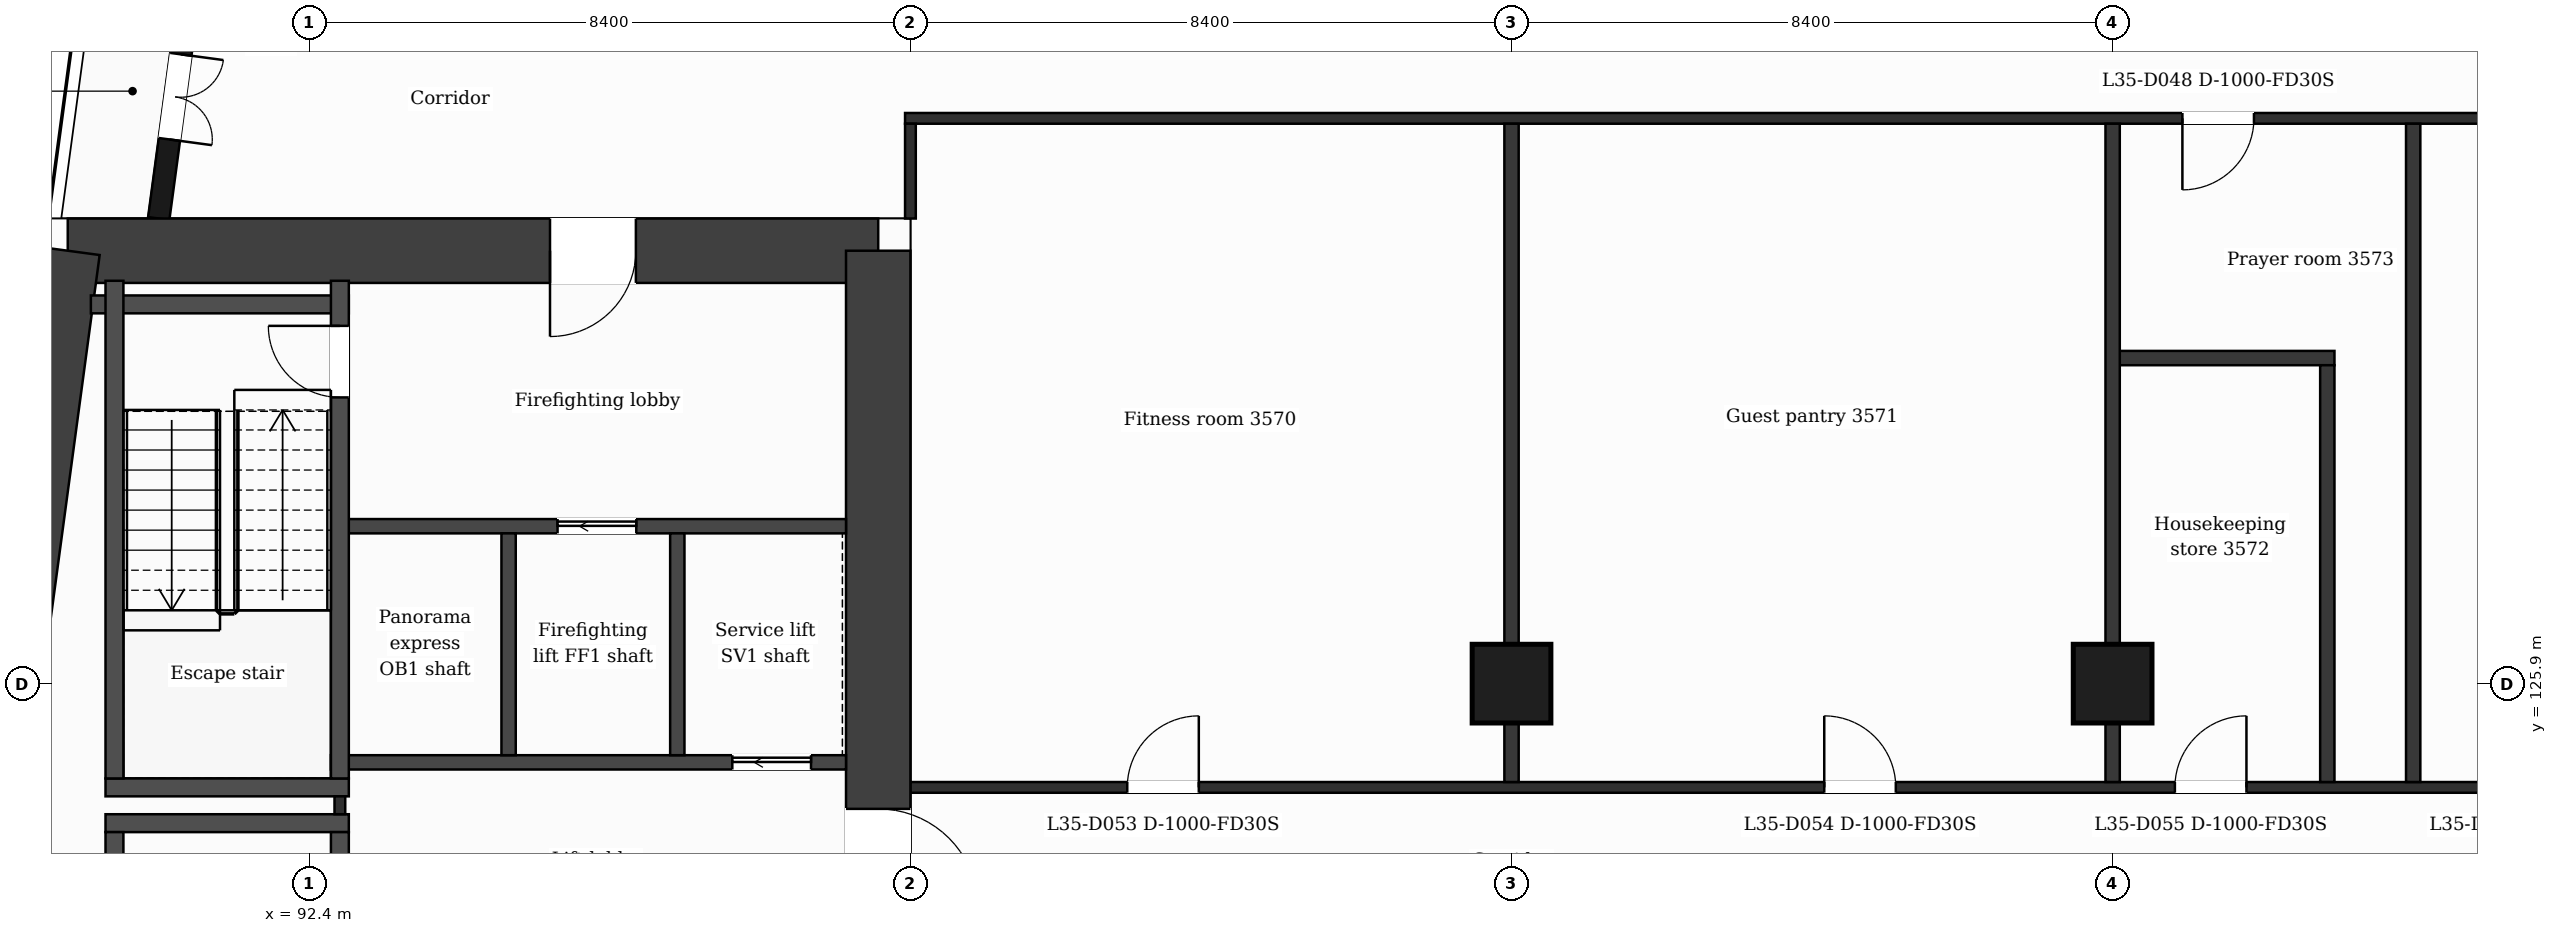
"""IFC4 building model, lengths in metres.
Left out: names, types, materials, properties, quantities, classifications, styles, units other than length and angle.
Written with IfcOpenShell. Run it as: python <this file> out.ifc"""

import sys

from ifc_helpers import new_model, si_unit, direction, frame, frame_2d, origin, origin_2d, place, context, subcontext, project, spatial, rectangle, extrude, element, fill, save


model = new_model("IFC4")
c1 = context("Model", 3, precision=1e-05, world=origin(), true_north=direction((0.0, 1.0)))
c2 = subcontext(c1, "Body", "Model", "MODEL_VIEW")
j1 = project(units=[si_unit("LENGTHUNIT", "METRE"), si_unit("PLANEANGLEUNIT", "RADIAN")], contexts=[c1])
p1 = place(None, origin())
s1 = spatial("IfcSite", under=j1, at=p1, CompositionType="ELEMENT")
p2 = place(p1, origin())
s2 = spatial("IfcBuilding", under=s1, at=p2, CompositionType="ELEMENT")
p3 = place(p2, frame((0.0, 0.0, 151.5)))
s3 = spatial("IfcBuildingStorey", under=s2, at=p3, CompositionType="ELEMENT", Elevation=151.5)
p4 = place(p3, frame((89.024, 131.95, 0.0), z_axis=(0.0, 0.0, 1.0), x_axis=(1.0, 0.0, 0.0)))
e1 = element("IfcWall", 1, at=p4, inside=s3, PredefinedType="SHEAR", context=c2, shape_type="SweptSolid", body=[
    extrude(rectangle(XDim=11.326, YDim=0.9, at=frame_2d((5.663, 0.0))), origin(), (0.0, 0.0, 1.0), 3.7),
])
p5 = place(p4, frame((6.739, 0.0, 0.0)))
e2 = element("IfcOpeningElement", 2, at=p5, cuts=e1, PredefinedType="OPENING", context=c2, shape_type="SweptSolid", body=[
    extrude(rectangle(XDim=1.2, YDim=2.1, at=frame_2d((0.6, 1.05))), frame((0.0, 0.46, 0.0), z_axis=(0.0, -1.0, 0.0), x_axis=(1.0, 0.0, 0.0)), (0.0, 0.0, 1.0), 0.92),
])
p6 = place(p3, frame((100.35, 131.95, 0.0), z_axis=(0.0, 0.0, 1.0), x_axis=(0.0, -1.0, 0.0)))
e3 = element("IfcWall", 3, at=p6, inside=s3, PredefinedType="SHEAR", context=c2, shape_type="SweptSolid", body=[
    extrude(rectangle(XDim=21.1, YDim=0.9, at=frame_2d((10.55, 0.0))), origin(), (0.0, 0.0, 1.0), 3.7),
])
p7 = place(p6, frame((7.8, 0.0, 0.0)))
e4 = element("IfcOpeningElement", 4, at=p7, cuts=e3, PredefinedType="OPENING", context=c2, shape_type="SweptSolid", body=[
    extrude(rectangle(XDim=1.4, YDim=2.1, at=frame_2d((0.7, 1.05))), frame((0.0, 0.46, 0.0), z_axis=(0.0, -1.0, 0.0), x_axis=(1.0, 0.0, 0.0)), (0.0, 0.0, 1.0), 0.92),
])
p8 = place(p3, frame((86.184, 110.85, 0.0), z_axis=(0.0, 0.0, 1.0), x_axis=(0.133410495943, 0.991060865725, 0.0)))
e5 = element("IfcWall", 5, at=p8, inside=s3, PredefinedType="SHEAR", context=c2, shape_type="SweptSolid", body=[
    extrude(rectangle(XDim=21.29, YDim=0.9, at=frame_2d((10.645, 0.0))), origin(), (0.0, 0.0, 1.0), 3.7),
])
for number, where, z_axis, x_axis in (
    (6, (109.2, 125.9, 0.0), (0.0, 0.0, 1.0), (1.0, 0.0, 0.0)),
    (7, (117.6, 125.9, 0.0), (0.0, 0.0, 1.0), (1.0, 0.0, 0.0)),
):
    element("IfcColumn", number, at=place(p3, frame(where, z_axis=z_axis, x_axis=x_axis)), inside=s3, PredefinedType="COLUMN", context=c2, shape_type="SweptSolid", body=[
        extrude(rectangle(XDim=1.1, YDim=1.1, at=origin_2d()), origin(), (0.0, 0.0, 1.0), 3.7),
    ])
p9 = place(p3, frame((91.177, 138.95, 0.0), z_axis=(0.0, 0.0, 1.0), x_axis=(-0.133426664613, -0.991058689065, 0.0)))
e8 = element("IfcWall", 8, at=p9, inside=s3, PredefinedType="SOLIDWALL", context=c2, shape_type="SweptSolid", body=[
    extrude(rectangle(XDim=6.609, YDim=0.3, at=frame_2d((3.305, 0.0))), origin(), (0.0, 0.0, 1.0), 3.38),
])
p10 = place(p9, frame((1.039, 0.0, 0.9)))
e9 = element("IfcOpeningElement", 9, at=p10, cuts=e8, PredefinedType="OPENING", context=c2, shape_type="SweptSolid", body=[
    extrude(rectangle(XDim=1.2, YDim=2.1, at=frame_2d((0.6, 1.05))), frame((0.0, 0.16, 0.0), z_axis=(0.0, -1.0, 0.0), x_axis=(1.0, 0.0, 0.0)), (0.0, 0.0, 1.0), 0.32),
])
p11 = place(p9, frame((4.294, 0.0, 0.0)))
e10 = element("IfcOpeningElement", 10, at=p11, cuts=e8, PredefinedType="OPENING", context=c2, shape_type="SweptSolid", body=[
    extrude(rectangle(XDim=1.2, YDim=2.4, at=frame_2d((0.6, 1.2))), frame((0.0, 0.16, 0.0), z_axis=(0.0, -1.0, 0.0), x_axis=(1.0, 0.0, 0.0)), (0.0, 0.0, 1.0), 0.32),
])
for number, where, z_axis, x_axis in (
    (11, (89.552, 123.95, 0.0), (0.0, 0.0, 1.0), (1.0, 0.0, 0.0)),
    (12, (89.552, 124.45, 0.0), (0.0, 0.0, 1.0), (1.0, 0.0, 0.0)),
):
    element("IfcWall", number, at=place(p3, frame(where, z_axis=z_axis, x_axis=x_axis)), inside=s3, PredefinedType="PARTITIONING", context=c2, shape_type="SweptSolid", body=[
        extrude(rectangle(XDim=3.4, YDim=0.25, at=frame_2d((1.7, 0.0))), origin(), (0.0, 0.0, 1.0), 3.38),
    ])
p12 = place(p3, frame((100.8, 124.45, 0.0), z_axis=(0.0, 0.0, 1.0), x_axis=(1.0, 0.0, 0.0)))
e13 = element("IfcWall", 13, at=p12, inside=s3, PredefinedType="PARTITIONING", context=c2, shape_type="SweptSolid", body=[
    extrude(rectangle(XDim=25.2, YDim=0.15, at=frame_2d((12.6, 0.0))), origin(), (0.0, 0.0, 1.0), 3.38),
])
p13 = place(p12, frame((3.03, 0.0, 0.0)))
e14 = element("IfcOpeningElement", 14, at=p13, cuts=e13, PredefinedType="OPENING", context=c2, shape_type="SweptSolid", body=[
    extrude(rectangle(XDim=1.0, YDim=2.1, at=frame_2d((0.5, 1.05))), frame((0.0, 0.085, 0.0), z_axis=(0.0, -1.0, 0.0), x_axis=(1.0, 0.0, 0.0)), (0.0, 0.0, 1.0), 0.17),
])
p14 = place(p12, frame((12.77, 0.0, 0.0)))
e15 = element("IfcOpeningElement", 15, at=p14, cuts=e13, PredefinedType="OPENING", context=c2, shape_type="SweptSolid", body=[
    extrude(rectangle(XDim=1.0, YDim=2.1, at=frame_2d((0.5, 1.05))), frame((0.0, 0.085, 0.0), z_axis=(0.0, -1.0, 0.0), x_axis=(1.0, 0.0, 0.0)), (0.0, 0.0, 1.0), 0.17),
])
p15 = place(p12, frame((17.67, 0.0, 0.0)))
e16 = element("IfcOpeningElement", 16, at=p15, cuts=e13, PredefinedType="OPENING", context=c2, shape_type="SweptSolid", body=[
    extrude(rectangle(XDim=1.0, YDim=2.1, at=frame_2d((0.5, 1.05))), frame((0.0, 0.085, 0.0), z_axis=(0.0, -1.0, 0.0), x_axis=(1.0, 0.0, 0.0)), (0.0, 0.0, 1.0), 0.17),
])
p16 = place(p12, frame((22.35, 0.0, 0.0)))
e17 = element("IfcOpeningElement", 17, at=p16, cuts=e13, PredefinedType="OPENING", context=c2, shape_type="SweptSolid", body=[
    extrude(rectangle(XDim=1.0, YDim=2.1, at=frame_2d((0.5, 1.05))), frame((0.0, 0.085, 0.0), z_axis=(0.0, -1.0, 0.0), x_axis=(1.0, 0.0, 0.0)), (0.0, 0.0, 1.0), 0.17),
])
p17 = place(p3, frame((92.702, 124.8, 0.0), z_axis=(0.0, 0.0, 1.0), x_axis=(1.0, 0.0, 0.0)))
e18 = element("IfcWall", 18, at=p17, inside=s3, PredefinedType="PARTITIONING", context=c2, shape_type="SweptSolid", body=[
    extrude(rectangle(XDim=7.198, YDim=0.2, at=frame_2d((3.599, 0.0))), origin(), (0.0, 0.0, 1.0), 3.38),
])
p18 = place(p17, frame((5.609, 0.0, 0.0)))
e19 = element("IfcOpeningElement", 19, at=p18, cuts=e18, PredefinedType="OPENING", context=c2, shape_type="SweptSolid", body=[
    extrude(rectangle(XDim=1.1, YDim=2.1, at=frame_2d((0.55, 1.05))), frame((0.0, 0.11, 0.0), z_axis=(0.0, -1.0, 0.0), x_axis=(1.0, 0.0, 0.0)), (0.0, 0.0, 1.0), 0.22),
])
p19 = place(p3, frame((92.827, 128.1, 0.0), z_axis=(0.0, 0.0, 1.0), x_axis=(1.0, 0.0, 0.0)))
e20 = element("IfcWall", 20, at=p19, inside=s3, PredefinedType="PARTITIONING", context=c2, shape_type="SweptSolid", body=[
    extrude(rectangle(XDim=7.073, YDim=0.2, at=frame_2d((3.537, 0.0))), origin(), (0.0, 0.0, 1.0), 3.38),
])
p20 = place(p19, frame((3.042, 0.0, 0.0)))
e21 = element("IfcOpeningElement", 21, at=p20, cuts=e20, PredefinedType="OPENING", context=c2, shape_type="SweptSolid", body=[
    extrude(rectangle(XDim=1.1, YDim=2.1, at=frame_2d((0.55, 1.05))), frame((0.0, 0.11, 0.0), z_axis=(0.0, -1.0, 0.0), x_axis=(1.0, 0.0, 0.0)), (0.0, 0.0, 1.0), 0.22),
])
p21 = place(p3, frame((117.6, 130.45, 0.0), z_axis=(0.0, 0.0, 1.0), x_axis=(1.0, 0.0, 0.0)))
e22 = element("IfcWall", 22, at=p21, inside=s3, PredefinedType="PARTITIONING", context=c2, shape_type="SweptSolid", body=[
    extrude(rectangle(XDim=3.1, YDim=0.2, at=frame_2d((1.55, 0.0))), origin(), (0.0, 0.0, 1.0), 3.38),
])
p22 = place(p3, frame((89.347, 131.2, 0.0), z_axis=(0.0, 0.0, 1.0), x_axis=(1.0, 0.0, 0.0)))
e23 = element("IfcWall", 23, at=p22, inside=s3, PredefinedType="PARTITIONING", context=c2, shape_type="SweptSolid", body=[
    extrude(rectangle(XDim=3.604, YDim=0.25, at=frame_2d((1.802, 0.0))), origin(), (0.0, 0.0, 1.0), 3.38),
])
p23 = place(p3, frame((100.725, 133.8, 0.0), z_axis=(0.0, 0.0, 1.0), x_axis=(1.0, 0.0, 0.0)))
e24 = element("IfcWall", 24, at=p23, inside=s3, PredefinedType="PARTITIONING", context=c2, shape_type="SweptSolid", body=[
    extrude(rectangle(XDim=25.35, YDim=0.15, at=frame_2d((12.675, 0.0))), origin(), (0.0, 0.0, 1.0), 3.38),
])
p24 = place(p23, frame((17.85, 0.0, 0.0)))
e25 = element("IfcOpeningElement", 25, at=p24, cuts=e24, PredefinedType="OPENING", context=c2, shape_type="SweptSolid", body=[
    extrude(rectangle(XDim=1.0, YDim=2.1, at=frame_2d((0.5, 1.05))), frame((0.0, 0.085, 0.0), z_axis=(0.0, -1.0, 0.0), x_axis=(1.0, 0.0, 0.0)), (0.0, 0.0, 1.0), 0.17),
])
p25 = place(p3, frame((89.677, 116.87, 0.0), z_axis=(0.0, 0.0, 1.0), x_axis=(0.0, 1.0, 0.0)))
e26 = element("IfcWall", 26, at=p25, inside=s3, PredefinedType="PARTITIONING", context=c2, shape_type="SweptSolid", body=[
    extrude(rectangle(XDim=6.955, YDim=0.25, at=frame_2d((3.478, 0.0))), origin(), (0.0, 0.0, 1.0), 3.38),
])
p26 = place(p3, frame((89.677, 124.575, 0.0), z_axis=(0.0, 0.0, 1.0), x_axis=(0.0, 1.0, 0.0)))
e27 = element("IfcWall", 27, at=p26, inside=s3, PredefinedType="PARTITIONING", context=c2, shape_type="SweptSolid", body=[
    extrude(rectangle(XDim=6.955, YDim=0.25, at=frame_2d((3.478, 0.0))), origin(), (0.0, 0.0, 1.0), 3.38),
])
p27 = place(p3, frame((92.827, 124.075, 0.0), z_axis=(0.0, 0.0, 1.0), x_axis=(0.0, 1.0, 0.0)))
e28 = element("IfcWall", 28, at=p27, inside=s3, PredefinedType="PARTITIONING", context=c2, shape_type="SweptSolid", body=[
    extrude(rectangle(XDim=0.25, YDim=0.15, at=frame_2d((0.125, 0.0))), origin(), (0.0, 0.0, 1.0), 3.38),
])
p28 = place(p3, frame((92.827, 116.87, 0.0), z_axis=(0.0, 0.0, 1.0), x_axis=(0.0, 1.0, 0.0)))
e29 = element("IfcWall", 29, at=p28, inside=s3, PredefinedType="PARTITIONING", context=c2, shape_type="SweptSolid", body=[
    extrude(rectangle(XDim=6.955, YDim=0.25, at=frame_2d((3.478, 0.0))), origin(), (0.0, 0.0, 1.0), 3.38),
])
p29 = place(p28, frame((5.655, 0.0, 0.0)))
e30 = element("IfcOpeningElement", 30, at=p29, cuts=e29, PredefinedType="OPENING", context=c2, shape_type="SweptSolid", body=[
    extrude(rectangle(XDim=0.95, YDim=2.1, at=frame_2d((0.475, 1.05))), frame((0.0, 0.135, 0.0), z_axis=(0.0, -1.0, 0.0), x_axis=(1.0, 0.0, 0.0)), (0.0, 0.0, 1.0), 0.27),
])
p30 = place(p3, frame((92.827, 124.575, 0.0), z_axis=(0.0, 0.0, 1.0), x_axis=(0.0, 1.0, 0.0)))
e31 = element("IfcWall", 31, at=p30, inside=s3, PredefinedType="PARTITIONING", context=c2, shape_type="SweptSolid", body=[
    extrude(rectangle(XDim=6.955, YDim=0.25, at=frame_2d((3.478, 0.0))), origin(), (0.0, 0.0, 1.0), 3.38),
])
p31 = place(p30, frame((5.325, 0.0, 0.0)))
e32 = element("IfcOpeningElement", 32, at=p31, cuts=e31, PredefinedType="OPENING", context=c2, shape_type="SweptSolid", body=[
    extrude(rectangle(XDim=1.0, YDim=2.1, at=frame_2d((0.5, 1.05))), frame((0.0, 0.135, 0.0), z_axis=(0.0, -1.0, 0.0), x_axis=(1.0, 0.0, 0.0)), (0.0, 0.0, 1.0), 0.27),
])
for number, where, z_axis, x_axis in (
    (33, (95.185, 124.9, 0.0), (0.0, 0.0, 1.0), (0.0, 1.0, 0.0)),
    (34, (97.542, 124.9, 0.0), (0.0, 0.0, 1.0), (0.0, 1.0, 0.0)),
):
    element("IfcWall", number, at=place(p3, frame(where, z_axis=z_axis, x_axis=x_axis)), inside=s3, PredefinedType="PARTITIONING", context=c2, shape_type="SweptSolid", body=[
        extrude(rectangle(XDim=3.1, YDim=0.2, at=frame_2d((1.55, 0.0))), origin(), (0.0, 0.0, 1.0), 3.38),
    ])
p32 = place(p3, frame((100.8, 132.4, 0.0), z_axis=(0.0, 0.0, 1.0), x_axis=(0.0, 1.0, 0.0)))
e35 = element("IfcWall", 35, at=p32, inside=s3, PredefinedType="PARTITIONING", context=c2, shape_type="SweptSolid", body=[
    extrude(rectangle(XDim=1.325, YDim=0.15, at=frame_2d((0.663, 0.0))), origin(), (0.0, 0.0, 1.0), 3.38),
])
for number, where, z_axis, x_axis in (
    (36, (109.2, 124.525, 0.0), (0.0, 0.0, 1.0), (0.0, 1.0, 0.0)),
    (37, (117.6, 124.525, 0.0), (0.0, 0.0, 1.0), (0.0, 1.0, 0.0)),
):
    element("IfcWall", number, at=place(p3, frame(where, z_axis=z_axis, x_axis=x_axis)), inside=s3, PredefinedType="PARTITIONING", context=c2, shape_type="SweptSolid", body=[
        extrude(rectangle(XDim=9.2, YDim=0.2, at=frame_2d((4.6, 0.0))), origin(), (0.0, 0.0, 1.0), 3.38),
    ])
p33 = place(p3, frame((120.6, 124.525, 0.0), z_axis=(0.0, 0.0, 1.0), x_axis=(0.0, 1.0, 0.0)))
e38 = element("IfcWall", 38, at=p33, inside=s3, PredefinedType="PARTITIONING", context=c2, shape_type="SweptSolid", body=[
    extrude(rectangle(XDim=5.825, YDim=0.2, at=frame_2d((2.913, 0.0))), origin(), (0.0, 0.0, 1.0), 3.38),
])
p34 = place(p3, frame((121.8, 124.525, 0.0), z_axis=(0.0, 0.0, 1.0), x_axis=(0.0, 1.0, 0.0)))
e39 = element("IfcWall", 39, at=p34, inside=s3, PredefinedType="PARTITIONING", context=c2, shape_type="SweptSolid", body=[
    extrude(rectangle(XDim=9.2, YDim=0.2, at=frame_2d((4.6, 0.0))), origin(), (0.0, 0.0, 1.0), 3.38),
])
p35 = place(p11, origin())
e40 = element("IfcDoor", 40, at=p35, inside=s3, OperationType="DOUBLE_DOOR_SINGLE_SWING", PredefinedType="DOOR", context=c2, shape_type="SweptSolid", body=[
    extrude(rectangle(XDim=1.2, YDim=2.4, at=frame_2d((0.6, 1.2))), frame((0.0, 0.025, 0.0), z_axis=(0.0, -1.0, 0.0), x_axis=(1.0, 0.0, 0.0)), (0.0, 0.0, 1.0), 0.05),
])
fill(e10, e40)
p36 = place(p20, origin())
e41 = element("IfcDoor", 41, at=p36, inside=s3, OperationType="SLIDING_TO_LEFT", PredefinedType="DOOR", context=c2, shape_type="SweptSolid", body=[
    extrude(rectangle(XDim=1.1, YDim=2.1, at=frame_2d((0.55, 1.05))), frame((0.0, 0.025, 0.0), z_axis=(0.0, -1.0, 0.0), x_axis=(1.0, 0.0, 0.0)), (0.0, 0.0, 1.0), 0.05),
])
fill(e21, e41)
p37 = place(p18, origin())
e42 = element("IfcDoor", 42, at=p37, inside=s3, OperationType="SLIDING_TO_LEFT", PredefinedType="DOOR", context=c2, shape_type="SweptSolid", body=[
    extrude(rectangle(XDim=1.1, YDim=2.1, at=frame_2d((0.55, 1.05))), frame((0.0, 0.025, 0.0), z_axis=(0.0, -1.0, 0.0), x_axis=(1.0, 0.0, 0.0)), (0.0, 0.0, 1.0), 0.05),
])
fill(e19, e42)
p38 = place(p31, origin())
e43 = element("IfcDoor", 43, at=p38, inside=s3, OperationType="SINGLE_SWING_RIGHT", PredefinedType="DOOR", context=c2, shape_type="SweptSolid", body=[
    extrude(rectangle(XDim=1.0, YDim=2.1, at=frame_2d((0.5, 1.05))), frame((0.0, 0.025, 0.0), z_axis=(0.0, -1.0, 0.0), x_axis=(1.0, 0.0, 0.0)), (0.0, 0.0, 1.0), 0.05),
])
fill(e32, e43)
p39 = place(p24, origin())
e44 = element("IfcDoor", 44, at=p39, inside=s3, OperationType="SINGLE_SWING_LEFT", PredefinedType="DOOR", context=c2, shape_type="SweptSolid", body=[
    extrude(rectangle(XDim=1.0, YDim=2.1, at=frame_2d((0.5, 1.05))), frame((0.0, 0.025, 0.0), z_axis=(0.0, -1.0, 0.0), x_axis=(1.0, 0.0, 0.0)), (0.0, 0.0, 1.0), 0.05),
])
fill(e25, e44)
p40 = place(p13, origin())
e45 = element("IfcDoor", 45, at=p40, inside=s3, OperationType="SINGLE_SWING_RIGHT", PredefinedType="DOOR", context=c2, shape_type="SweptSolid", body=[
    extrude(rectangle(XDim=1.0, YDim=2.1, at=frame_2d((0.5, 1.05))), frame((0.0, 0.025, 0.0), z_axis=(0.0, -1.0, 0.0), x_axis=(1.0, 0.0, 0.0)), (0.0, 0.0, 1.0), 0.05),
])
fill(e14, e45)
p41 = place(p14, origin())
e46 = element("IfcDoor", 46, at=p41, inside=s3, OperationType="SINGLE_SWING_LEFT", PredefinedType="DOOR", context=c2, shape_type="SweptSolid", body=[
    extrude(rectangle(XDim=1.0, YDim=2.1, at=frame_2d((0.5, 1.05))), frame((0.0, 0.025, 0.0), z_axis=(0.0, -1.0, 0.0), x_axis=(1.0, 0.0, 0.0)), (0.0, 0.0, 1.0), 0.05),
])
fill(e15, e46)
p42 = place(p15, origin())
e47 = element("IfcDoor", 47, at=p42, inside=s3, OperationType="SINGLE_SWING_RIGHT", PredefinedType="DOOR", context=c2, shape_type="SweptSolid", body=[
    extrude(rectangle(XDim=1.0, YDim=2.1, at=frame_2d((0.5, 1.05))), frame((0.0, 0.025, 0.0), z_axis=(0.0, -1.0, 0.0), x_axis=(1.0, 0.0, 0.0)), (0.0, 0.0, 1.0), 0.05),
])
fill(e16, e47)
p43 = place(p5, origin())
e48 = element("IfcDoor", 48, at=p43, inside=s3, OperationType="SINGLE_SWING_LEFT", PredefinedType="DOOR", context=c2, shape_type="SweptSolid", body=[
    extrude(rectangle(XDim=1.2, YDim=2.1, at=frame_2d((0.6, 1.05))), frame((0.0, 0.025, 0.0), z_axis=(0.0, -1.0, 0.0), x_axis=(1.0, 0.0, 0.0)), (0.0, 0.0, 1.0), 0.05),
])
fill(e2, e48)
p44 = place(p7, origin())
e49 = element("IfcDoor", 49, at=p44, inside=s3, OperationType="SINGLE_SWING_RIGHT", PredefinedType="DOOR", context=c2, shape_type="SweptSolid", body=[
    extrude(rectangle(XDim=1.4, YDim=2.1, at=frame_2d((0.7, 1.05))), frame((0.0, 0.025, 0.0), z_axis=(0.0, -1.0, 0.0), x_axis=(1.0, 0.0, 0.0)), (0.0, 0.0, 1.0), 0.05),
])
fill(e4, e49)
save(model, sys.argv[1])
